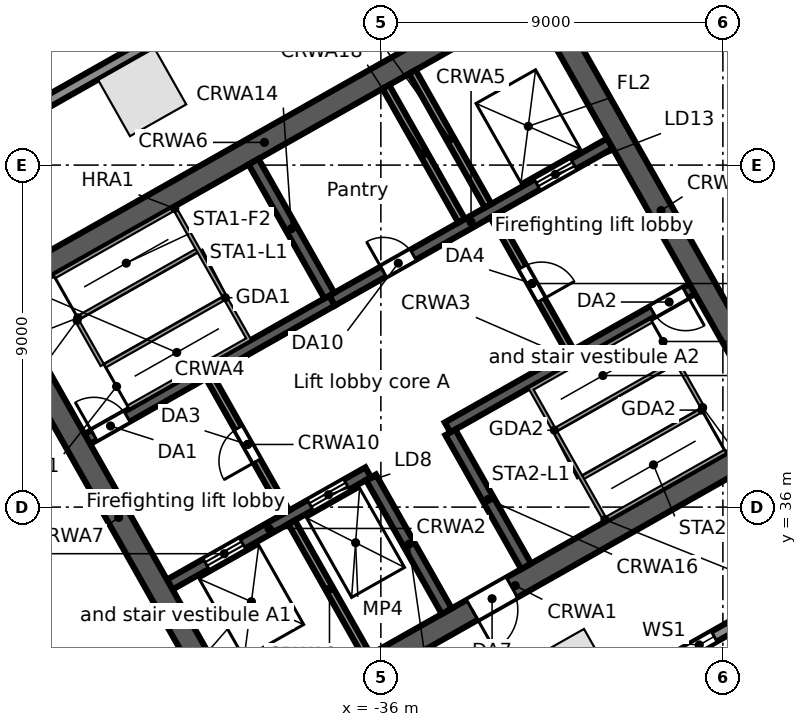
"""IFC4 building model, lengths in metres.
Left out: names, types, materials, properties, quantities, classifications, styles, units other than length and angle.
Written with IfcOpenShell. Run it as: python <this file> out.ifc"""

import sys

from ifc_helpers import new_model, si_unit, direction, frame, frame_2d, origin, origin_2d, place, context, subcontext, project, spatial, rectangle, extrude, element, fill, save


model = new_model("IFC4")
c1 = context("Model", 3, precision=1e-05, world=origin(), true_north=direction((0.0, 1.0)))
c2 = subcontext(c1, "Body", "Model", "MODEL_VIEW")
j1 = project(units=[si_unit("LENGTHUNIT", "METRE"), si_unit("PLANEANGLEUNIT", "RADIAN")], contexts=[c1])
p1 = place(None, origin())
s1 = spatial("IfcSite", under=j1, at=p1, CompositionType="ELEMENT")
p2 = place(p1, origin())
s2 = spatial("IfcBuilding", under=s1, at=p2, CompositionType="ELEMENT")
p3 = place(p2, frame((0.0, 0.0, 41.5)))
s3 = spatial("IfcBuildingStorey", under=s2, at=p3, CompositionType="ELEMENT", Elevation=41.5)
for number, where, z_axis, x_axis in (
    (1, (-42.28, 46.919, 0.0), (0.0, 0.0, 1.0), (-0.87, -0.492, 0.0)),
    (2, (-30.976, 31.635, 0.0), (0.0, 0.0, 1.0), (0.87, 0.492, 0.0)),
):
    element("IfcColumn", number, at=place(p3, frame(where, z_axis=z_axis, x_axis=x_axis)), inside=s3, PredefinedType="COLUMN", context=c2, shape_type="SweptSolid", body=[
        extrude(rectangle(XDim=1.7, YDim=1.7, at=origin_2d()), origin(), (0.0, 0.0, 1.0), 5.0),
    ])
p4 = place(p3, frame((-58.745, 38.764, 0.0), z_axis=(0.0, 0.0, 1.0), x_axis=(0.870355811726, 0.492423355453, 0.0)))
e3 = element("IfcWall", 3, at=p4, inside=s3, PredefinedType="STANDARD", context=c2, shape_type="SweptSolid", body=[
    extrude(rectangle(XDim=64.025, YDim=0.3, at=frame_2d((32.013, 0.0))), origin(), (0.0, 0.0, 1.0), 4.68),
])
p5 = place(p4, frame((60.122, 0.0, 0.6)))
e4 = element("IfcOpeningElement", 4, at=p5, cuts=e3, PredefinedType="OPENING", context=c2, shape_type="SweptSolid", body=[
    extrude(rectangle(XDim=0.9, YDim=3.2, at=frame_2d((0.45, 1.6))), frame((0.0, 0.16, 0.0), z_axis=(0.0, -1.0, 0.0), x_axis=(1.0, 0.0, 0.0)), (0.0, 0.0, 1.0), 0.32),
])
p6 = place(p4, frame((50.992, 0.0, 0.6)))
e5 = element("IfcOpeningElement", 5, at=p6, cuts=e3, PredefinedType="OPENING", context=c2, shape_type="SweptSolid", body=[
    extrude(rectangle(XDim=0.9, YDim=3.2, at=frame_2d((0.45, 1.6))), frame((0.0, 0.16, 0.0), z_axis=(0.0, -1.0, 0.0), x_axis=(1.0, 0.0, 0.0)), (0.0, 0.0, 1.0), 0.32),
])
p7 = place(p4, frame((41.862, 0.0, 0.6)))
e6 = element("IfcOpeningElement", 6, at=p7, cuts=e3, PredefinedType="OPENING", context=c2, shape_type="SweptSolid", body=[
    extrude(rectangle(XDim=0.9, YDim=3.2, at=frame_2d((0.45, 1.6))), frame((0.0, 0.16, 0.0), z_axis=(0.0, -1.0, 0.0), x_axis=(1.0, 0.0, 0.0)), (0.0, 0.0, 1.0), 0.32),
])
p8 = place(p4, frame((32.732, 0.0, 0.6)))
e7 = element("IfcOpeningElement", 7, at=p8, cuts=e3, PredefinedType="OPENING", context=c2, shape_type="SweptSolid", body=[
    extrude(rectangle(XDim=0.9, YDim=3.2, at=frame_2d((0.45, 1.6))), frame((0.0, 0.16, 0.0), z_axis=(0.0, -1.0, 0.0), x_axis=(1.0, 0.0, 0.0)), (0.0, 0.0, 1.0), 0.32),
])
p9 = place(p4, frame((23.602, 0.0, 0.6)))
e8 = element("IfcOpeningElement", 8, at=p9, cuts=e3, PredefinedType="OPENING", context=c2, shape_type="SweptSolid", body=[
    extrude(rectangle(XDim=0.9, YDim=3.2, at=frame_2d((0.45, 1.6))), frame((0.0, 0.16, 0.0), z_axis=(0.0, -1.0, 0.0), x_axis=(1.0, 0.0, 0.0)), (0.0, 0.0, 1.0), 0.32),
])
p10 = place(p4, frame((14.472, 0.0, 0.6)))
e9 = element("IfcOpeningElement", 9, at=p10, cuts=e3, PredefinedType="OPENING", context=c2, shape_type="SweptSolid", body=[
    extrude(rectangle(XDim=0.9, YDim=3.2, at=frame_2d((0.45, 1.6))), frame((0.0, 0.16, 0.0), z_axis=(0.0, -1.0, 0.0), x_axis=(1.0, 0.0, 0.0)), (0.0, 0.0, 1.0), 0.32),
])
p11 = place(p4, frame((5.342, 0.0, 0.6)))
e10 = element("IfcOpeningElement", 10, at=p11, cuts=e3, PredefinedType="OPENING", context=c2, shape_type="SweptSolid", body=[
    extrude(rectangle(XDim=0.9, YDim=3.2, at=frame_2d((0.45, 1.6))), frame((0.0, 0.16, 0.0), z_axis=(0.0, -1.0, 0.0), x_axis=(1.0, 0.0, 0.0)), (0.0, 0.0, 1.0), 0.32),
])
p12 = place(p3, frame((-44.109, 26.504, 0.0), z_axis=(0.0, 0.0, 1.0), x_axis=(-0.857169502585, 0.515034410344, 0.0)))
e11 = element("IfcWall", 11, at=p12, inside=s3, PredefinedType="STANDARD", context=c2, shape_type="SweptSolid", body=[
    extrude(rectangle(XDim=17.127, YDim=0.3, at=frame_2d((8.563, 0.0))), origin(), (0.0, 0.0, 1.0), 4.68),
])
p13 = place(p12, frame((13.403, 0.0, 0.6)))
e12 = element("IfcOpeningElement", 12, at=p13, cuts=e11, PredefinedType="OPENING", context=c2, shape_type="SweptSolid", body=[
    extrude(rectangle(XDim=0.9, YDim=3.2, at=frame_2d((0.45, 1.6))), frame((0.0, 0.16, 0.0), z_axis=(0.0, -1.0, 0.0), x_axis=(1.0, 0.0, 0.0)), (0.0, 0.0, 1.0), 0.32),
])
p14 = place(p12, frame((4.903, 0.0, 0.6)))
e13 = element("IfcOpeningElement", 13, at=p14, cuts=e11, PredefinedType="OPENING", context=c2, shape_type="SweptSolid", body=[
    extrude(rectangle(XDim=0.9, YDim=3.2, at=frame_2d((0.45, 1.6))), frame((0.0, 0.16, 0.0), z_axis=(0.0, -1.0, 0.0), x_axis=(1.0, 0.0, 0.0)), (0.0, 0.0, 1.0), 0.32),
])
p15 = place(p3, frame((-0.055, 47.969, 0.0), z_axis=(0.0, 0.0, 1.0), x_axis=(-0.870355730478, -0.492423499058, 0.0)))
e14 = element("IfcWall", 14, at=p15, inside=s3, PredefinedType="STANDARD", context=c2, shape_type="SweptSolid", body=[
    extrude(rectangle(XDim=43.75, YDim=0.3, at=frame_2d((21.875, 0.0))), origin(), (0.0, 0.0, 1.0), 4.68),
])
p16 = place(p15, frame((39.977, 0.0, 0.6)))
e15 = element("IfcOpeningElement", 15, at=p16, cuts=e14, PredefinedType="OPENING", context=c2, shape_type="SweptSolid", body=[
    extrude(rectangle(XDim=0.9, YDim=3.2, at=frame_2d((0.45, 1.6))), frame((0.0, 0.16, 0.0), z_axis=(0.0, -1.0, 0.0), x_axis=(1.0, 0.0, 0.0)), (0.0, 0.0, 1.0), 0.32),
])
p17 = place(p15, frame((31.222, 0.0, 0.6)))
e16 = element("IfcOpeningElement", 16, at=p17, cuts=e14, PredefinedType="OPENING", context=c2, shape_type="SweptSolid", body=[
    extrude(rectangle(XDim=0.9, YDim=3.2, at=frame_2d((0.45, 1.6))), frame((0.0, 0.16, 0.0), z_axis=(0.0, -1.0, 0.0), x_axis=(1.0, 0.0, 0.0)), (0.0, 0.0, 1.0), 0.32),
])
p18 = place(p15, frame((22.468, 0.0, 0.6)))
e17 = element("IfcOpeningElement", 17, at=p18, cuts=e14, PredefinedType="OPENING", context=c2, shape_type="SweptSolid", body=[
    extrude(rectangle(XDim=0.9, YDim=3.2, at=frame_2d((0.45, 1.6))), frame((0.0, 0.16, 0.0), z_axis=(0.0, -1.0, 0.0), x_axis=(1.0, 0.0, 0.0)), (0.0, 0.0, 1.0), 0.32),
])
p19 = place(p15, frame((13.713, 0.0, 0.6)))
e18 = element("IfcOpeningElement", 18, at=p19, cuts=e14, PredefinedType="OPENING", context=c2, shape_type="SweptSolid", body=[
    extrude(rectangle(XDim=0.9, YDim=3.2, at=frame_2d((0.45, 1.6))), frame((0.0, 0.16, 0.0), z_axis=(0.0, -1.0, 0.0), x_axis=(1.0, 0.0, 0.0)), (0.0, 0.0, 1.0), 0.32),
])
p20 = place(p15, frame((4.959, 0.0, 0.6)))
e19 = element("IfcOpeningElement", 19, at=p20, cuts=e14, PredefinedType="OPENING", context=c2, shape_type="SweptSolid", body=[
    extrude(rectangle(XDim=0.9, YDim=3.2, at=frame_2d((0.45, 1.6))), frame((0.0, 0.16, 0.0), z_axis=(0.0, -1.0, 0.0), x_axis=(1.0, 0.0, 0.0)), (0.0, 0.0, 1.0), 0.32),
])
p21 = place(p3, frame((-39.862, 29.749, 0.0), z_axis=(0.0, 0.0, 1.0), x_axis=(0.870350116061, 0.492433422375, 0.0)))
e20 = element("IfcWall", 20, at=p21, inside=s3, PredefinedType="SOLIDWALL", context=c2, shape_type="SweptSolid", body=[
    extrude(rectangle(XDim=17.0, YDim=0.6, at=frame_2d((8.5, 0.0))), origin(), (0.0, 0.0, 1.0), 4.68),
])
p22 = place(p21, frame((7.2, 0.0, 0.0)))
e21 = element("IfcOpeningElement", 21, at=p22, cuts=e20, PredefinedType="OPENING", context=c2, shape_type="SweptSolid", body=[
    extrude(rectangle(XDim=1.2, YDim=2.1, at=frame_2d((0.6, 1.05))), frame((0.0, 0.31, 0.0), z_axis=(0.0, -1.0, 0.0), x_axis=(1.0, 0.0, 0.0)), (0.0, 0.0, 1.0), 0.62),
])
p23 = place(p3, frame((-41.556, 33.961, 0.0), z_axis=(0.0, 0.0, 1.0), x_axis=(0.870343731308, 0.492444706919, 0.0)))
e22 = element("IfcWall", 22, at=p23, inside=s3, PredefinedType="SOLIDWALL", context=c2, shape_type="SweptSolid", body=[
    extrude(rectangle(XDim=6.0, YDim=0.3, at=frame_2d((3.0, 0.0))), origin(), (0.0, 0.0, 1.0), 4.68),
])
p24 = place(p23, frame((1.1, 0.0, 0.0)))
e23 = element("IfcOpeningElement", 23, at=p24, cuts=e22, PredefinedType="OPENING", context=c2, shape_type="SweptSolid", body=[
    extrude(rectangle(XDim=1.1, YDim=2.1, at=frame_2d((0.55, 1.05))), frame((0.0, 0.16, 0.0), z_axis=(0.0, -1.0, 0.0), x_axis=(1.0, 0.0, 0.0)), (0.0, 0.0, 1.0), 0.32),
])
p25 = place(p23, frame((4.25, 0.0, 0.0)))
e24 = element("IfcOpeningElement", 24, at=p25, cuts=e22, PredefinedType="OPENING", context=c2, shape_type="SweptSolid", body=[
    extrude(rectangle(XDim=1.1, YDim=2.1, at=frame_2d((0.55, 1.05))), frame((0.0, 0.16, 0.0), z_axis=(0.0, -1.0, 0.0), x_axis=(1.0, 0.0, 0.0)), (0.0, 0.0, 1.0), 0.32),
])
p26 = place(p3, frame((-34.245, 38.097, 0.0), z_axis=(0.0, 0.0, 1.0), x_axis=(0.870364910201, 0.492407273597, 0.0)))
e25 = element("IfcWall", 25, at=p26, inside=s3, PredefinedType="SOLIDWALL", context=c2, shape_type="SweptSolid", body=[
    extrude(rectangle(XDim=7.4, YDim=0.3, at=frame_2d((3.7, 0.0))), origin(), (0.0, 0.0, 1.0), 4.68),
])
p27 = place(p26, frame((6.2, 0.0, 0.0)))
e26 = element("IfcOpeningElement", 26, at=p27, cuts=e25, PredefinedType="OPENING", context=c2, shape_type="SweptSolid", body=[
    extrude(rectangle(XDim=1.0, YDim=2.1, at=frame_2d((0.5, 1.05))), frame((0.0, 0.16, 0.0), z_axis=(0.0, -1.0, 0.0), x_axis=(1.0, 0.0, 0.0)), (0.0, 0.0, 1.0), 0.32),
])
p28 = place(p3, frame((-43.723, 37.791, 0.0), z_axis=(0.0, 0.0, 1.0), x_axis=(0.87035077051, 0.49243226567, 0.0)))
e27 = element("IfcWall", 27, at=p28, inside=s3, PredefinedType="SOLIDWALL", context=c2, shape_type="SweptSolid", body=[
    extrude(rectangle(XDim=7.4, YDim=0.3, at=frame_2d((3.7, 0.0))), origin(), (0.0, 0.0, 1.0), 4.68),
])
p29 = place(p28, frame((0.2, 0.0, 0.0)))
e28 = element("IfcOpeningElement", 28, at=p29, cuts=e27, PredefinedType="OPENING", context=c2, shape_type="SweptSolid", body=[
    extrude(rectangle(XDim=1.0, YDim=2.1, at=frame_2d((0.5, 1.05))), frame((0.0, 0.16, 0.0), z_axis=(0.0, -1.0, 0.0), x_axis=(1.0, 0.0, 0.0)), (0.0, 0.0, 1.0), 0.32),
])
p30 = place(p3, frame((-37.282, 41.435, 0.0), z_axis=(0.0, 0.0, 1.0), x_axis=(0.870356516133, 0.492422110414, 0.0)))
e29 = element("IfcWall", 29, at=p30, inside=s3, PredefinedType="SOLIDWALL", context=c2, shape_type="SweptSolid", body=[
    extrude(rectangle(XDim=8.4, YDim=0.3, at=frame_2d((4.2, 0.0))), origin(), (0.0, 0.0, 1.0), 4.68),
])
p31 = place(p30, frame((6.2, 0.0, 0.0)))
e30 = element("IfcOpeningElement", 30, at=p31, cuts=e29, PredefinedType="OPENING", context=c2, shape_type="SweptSolid", body=[
    extrude(rectangle(XDim=1.1, YDim=2.1, at=frame_2d((0.55, 1.05))), frame((0.0, 0.16, 0.0), z_axis=(0.0, -1.0, 0.0), x_axis=(1.0, 0.0, 0.0)), (0.0, 0.0, 1.0), 0.32),
])
p32 = place(p30, frame((1.55, 0.0, 0.0)))
e31 = element("IfcOpeningElement", 31, at=p32, cuts=e29, PredefinedType="OPENING", context=c2, shape_type="SweptSolid", body=[
    extrude(rectangle(XDim=0.9, YDim=2.1, at=frame_2d((0.45, 1.05))), frame((0.0, 0.16, 0.0), z_axis=(0.0, -1.0, 0.0), x_axis=(1.0, 0.0, 0.0)), (0.0, 0.0, 1.0), 0.32),
])
p33 = place(p3, frame((-46.461, 41.412, 0.0), z_axis=(0.0, 0.0, 1.0), x_axis=(0.870350116061, 0.492433422375, 0.0)))
e32 = element("IfcWall", 32, at=p33, inside=s3, PredefinedType="SOLIDWALL", context=c2, shape_type="SweptSolid", body=[
    extrude(rectangle(XDim=17.0, YDim=0.6, at=frame_2d((8.5, 0.0))), origin(), (0.0, 0.0, 1.0), 4.68),
])
p34 = place(p3, frame((-46.052, 41.298, 0.0), z_axis=(0.0, 0.0, 1.0), x_axis=(0.492418598281, -0.870358503186, 0.0)))
e33 = element("IfcWall", 33, at=p34, inside=s3, PredefinedType="SOLIDWALL", context=c2, shape_type="SweptSolid", body=[
    extrude(rectangle(XDim=12.8, YDim=0.6, at=frame_2d((6.4, 0.0))), origin(), (0.0, 0.0, 1.0), 4.68),
])
p35 = place(p3, frame((-38.349, 35.603, 0.0), z_axis=(0.0, 0.0, 1.0), x_axis=(0.49241474071, -0.870360685654, 0.0)))
e34 = element("IfcWall", 34, at=p35, inside=s3, PredefinedType="SOLIDWALL", context=c2, shape_type="SweptSolid", body=[
    extrude(rectangle(XDim=4.05, YDim=0.2, at=frame_2d((2.025, 0.0))), origin(), (0.0, 0.0, 1.0), 4.68),
])
p36 = place(p3, frame((-40.516, 39.433, 0.0), z_axis=(0.0, 0.0, 1.0), x_axis=(0.492453559952, -0.87033872216, 0.0)))
e35 = element("IfcWall", 35, at=p36, inside=s3, PredefinedType="PARTITIONING", context=c2, shape_type="SweptSolid", body=[
    extrude(rectangle(XDim=4.1, YDim=0.2, at=frame_2d((2.05, 0.0))), origin(), (0.0, 0.0, 1.0), 4.68),
])
p37 = place(p36, frame((1.55, 0.0, 0.0)))
e36 = element("IfcOpeningElement", 36, at=p37, cuts=e35, PredefinedType="OPENING", context=c2, shape_type="SweptSolid", body=[
    extrude(rectangle(XDim=1.0, YDim=2.1, at=frame_2d((0.5, 1.05))), frame((0.0, 0.11, 0.0), z_axis=(0.0, -1.0, 0.0), x_axis=(1.0, 0.0, 0.0)), (0.0, 0.0, 1.0), 0.22),
])
p38 = place(p3, frame((-36.26, 36.785, 0.0), z_axis=(0.0, 0.0, 1.0), x_axis=(0.492440575896, -0.870346068648, 0.0)))
e37 = element("IfcWall", 37, at=p38, inside=s3, PredefinedType="SOLIDWALL", context=c2, shape_type="SweptSolid", body=[
    extrude(rectangle(XDim=4.05, YDim=0.3, at=frame_2d((2.025, 0.0))), origin(), (0.0, 0.0, 1.0), 4.68),
])
p39 = place(p3, frame((-39.35, 45.09, 0.0), z_axis=(0.0, 0.0, 1.0), x_axis=(0.49241474071, -0.870360685654, 0.0)))
e38 = element("IfcWall", 38, at=p39, inside=s3, PredefinedType="SOLIDWALL", context=c2, shape_type="SweptSolid", body=[
    extrude(rectangle(XDim=4.05, YDim=0.3, at=frame_2d((2.025, 0.0))), origin(), (0.0, 0.0, 1.0), 4.68),
])
p40 = place(p3, frame((-34.171, 37.967, 0.0), z_axis=(0.0, 0.0, 1.0), x_axis=(0.492394910396, -0.870371904542, 0.0)))
e39 = element("IfcWall", 39, at=p40, inside=s3, PredefinedType="SOLIDWALL", context=c2, shape_type="SweptSolid", body=[
    extrude(rectangle(XDim=4.05, YDim=0.3, at=frame_2d((2.025, 0.0))), origin(), (0.0, 0.0, 1.0), 4.68),
])
p41 = place(p3, frame((-35.869, 47.06, 0.0), z_axis=(0.0, 0.0, 1.0), x_axis=(0.49241474071, -0.870360685654, 0.0)))
e40 = element("IfcWall", 40, at=p41, inside=s3, PredefinedType="SOLIDWALL", context=c2, shape_type="SweptSolid", body=[
    extrude(rectangle(XDim=4.05, YDim=0.2, at=frame_2d((2.025, 0.0))), origin(), (0.0, 0.0, 1.0), 4.68),
])
p42 = place(p3, frame((-33.031, 43.667, 0.0), z_axis=(0.0, 0.0, 1.0), x_axis=(0.492408451753, -0.87036424366, 0.0)))
e41 = element("IfcWall", 41, at=p42, inside=s3, PredefinedType="PARTITIONING", context=c2, shape_type="SweptSolid", body=[
    extrude(rectangle(XDim=4.1, YDim=0.2, at=frame_2d((2.05, 0.0))), origin(), (0.0, 0.0, 1.0), 4.68),
])
p43 = place(p42, frame((1.55, 0.0, 0.0)))
e42 = element("IfcOpeningElement", 42, at=p43, cuts=e41, PredefinedType="OPENING", context=c2, shape_type="SweptSolid", body=[
    extrude(rectangle(XDim=1.0, YDim=2.1, at=frame_2d((0.5, 1.05))), frame((0.0, 0.11, 0.0), z_axis=(0.0, -1.0, 0.0), x_axis=(1.0, 0.0, 0.0)), (0.0, 0.0, 1.0), 0.22),
])
p44 = place(p3, frame((-35.173, 47.454, 0.0), z_axis=(0.0, 0.0, 1.0), x_axis=(0.492440575896, -0.870346068648, 0.0)))
e43 = element("IfcWall", 43, at=p44, inside=s3, PredefinedType="SOLIDWALL", context=c2, shape_type="SweptSolid", body=[
    extrude(rectangle(XDim=4.05, YDim=0.2, at=frame_2d((2.025, 0.0))), origin(), (0.0, 0.0, 1.0), 4.68),
])
p45 = place(p3, frame((-31.778, 49.374, 0.0), z_axis=(0.0, 0.0, 1.0), x_axis=(0.492433046652, -0.870350328641, 0.0)))
e44 = element("IfcWall", 44, at=p45, inside=s3, PredefinedType="SOLIDWALL", context=c2, shape_type="SweptSolid", body=[
    extrude(rectangle(XDim=12.8, YDim=0.6, at=frame_2d((6.4, 0.0))), origin(), (0.0, 0.0, 1.0), 4.68),
])
p46 = place(p17, origin())
e45 = element("IfcWindow", 45, at=p46, inside=s3, PartitioningType="SINGLE_PANEL", PredefinedType="WINDOW", context=c2, shape_type="SweptSolid", body=[
    extrude(rectangle(XDim=0.9, YDim=3.2, at=frame_2d((0.45, 1.6))), frame((0.0, 0.03, 0.0), z_axis=(0.0, -1.0, 0.0), x_axis=(1.0, 0.0, 0.0)), (0.0, 0.0, 1.0), 0.06),
])
fill(e16, e45)
p47 = place(p31, origin())
e46 = element("IfcDoor", 46, at=p47, inside=s3, OperationType="DOUBLE_DOOR_SLIDING", PredefinedType="DOOR", context=c2, shape_type="SweptSolid", body=[
    extrude(rectangle(XDim=1.1, YDim=2.1, at=frame_2d((0.55, 1.05))), frame((0.0, 0.025, 0.0), z_axis=(0.0, -1.0, 0.0), x_axis=(1.0, 0.0, 0.0)), (0.0, 0.0, 1.0), 0.05),
])
fill(e30, e46)
p48 = place(p24, origin())
e47 = element("IfcDoor", 47, at=p48, inside=s3, OperationType="DOUBLE_DOOR_SLIDING", PredefinedType="DOOR", context=c2, shape_type="SweptSolid", body=[
    extrude(rectangle(XDim=1.1, YDim=2.1, at=frame_2d((0.55, 1.05))), frame((0.0, 0.025, 0.0), z_axis=(0.0, -1.0, 0.0), x_axis=(1.0, 0.0, 0.0)), (0.0, 0.0, 1.0), 0.05),
])
fill(e23, e47)
p49 = place(p25, origin())
e48 = element("IfcDoor", 48, at=p49, inside=s3, OperationType="DOUBLE_DOOR_SLIDING", PredefinedType="DOOR", context=c2, shape_type="SweptSolid", body=[
    extrude(rectangle(XDim=1.1, YDim=2.1, at=frame_2d((0.55, 1.05))), frame((0.0, 0.025, 0.0), z_axis=(0.0, -1.0, 0.0), x_axis=(1.0, 0.0, 0.0)), (0.0, 0.0, 1.0), 0.05),
])
fill(e24, e48)
p50 = place(p29, origin())
e49 = element("IfcDoor", 49, at=p50, inside=s3, OperationType="SINGLE_SWING_LEFT", PredefinedType="DOOR", context=c2, shape_type="SweptSolid", body=[
    extrude(rectangle(XDim=1.0, YDim=2.1, at=frame_2d((0.5, 1.05))), frame((0.0, 0.025, 0.0), z_axis=(0.0, -1.0, 0.0), x_axis=(1.0, 0.0, 0.0)), (0.0, 0.0, 1.0), 0.05),
])
fill(e28, e49)
p51 = place(p27, frame((1.0, 0.0, 0.0), z_axis=(0.0, 0.0, 1.0), x_axis=(-1.0, 0.0, 0.0)))
e50 = element("IfcDoor", 50, at=p51, inside=s3, OperationType="SINGLE_SWING_LEFT", PredefinedType="DOOR", context=c2, shape_type="SweptSolid", body=[
    extrude(rectangle(XDim=1.0, YDim=2.1, at=frame_2d((0.5, 1.05))), frame((0.0, 0.025, 0.0), z_axis=(0.0, -1.0, 0.0), x_axis=(1.0, 0.0, 0.0)), (0.0, 0.0, 1.0), 0.05),
])
fill(e26, e50)
p52 = place(p37, frame((1.0, 0.0, 0.0), z_axis=(0.0, 0.0, 1.0), x_axis=(-1.0, 0.0, 0.0)))
e51 = element("IfcDoor", 51, at=p52, inside=s3, OperationType="SINGLE_SWING_LEFT", PredefinedType="DOOR", context=c2, shape_type="SweptSolid", body=[
    extrude(rectangle(XDim=1.0, YDim=2.1, at=frame_2d((0.5, 1.05))), frame((0.0, 0.025, 0.0), z_axis=(0.0, -1.0, 0.0), x_axis=(1.0, 0.0, 0.0)), (0.0, 0.0, 1.0), 0.05),
])
fill(e36, e51)
p53 = place(p43, origin())
e52 = element("IfcDoor", 52, at=p53, inside=s3, OperationType="SINGLE_SWING_RIGHT", PredefinedType="DOOR", context=c2, shape_type="SweptSolid", body=[
    extrude(rectangle(XDim=1.0, YDim=2.1, at=frame_2d((0.5, 1.05))), frame((0.0, 0.025, 0.0), z_axis=(0.0, -1.0, 0.0), x_axis=(1.0, 0.0, 0.0)), (0.0, 0.0, 1.0), 0.05),
])
fill(e42, e52)
p54 = place(p22, frame((1.2, 0.0, 0.0), z_axis=(0.0, 0.0, 1.0), x_axis=(-1.0, 0.0, 0.0)))
e53 = element("IfcDoor", 53, at=p54, inside=s3, OperationType="SINGLE_SWING_RIGHT", PredefinedType="DOOR", context=c2, shape_type="SweptSolid", body=[
    extrude(rectangle(XDim=1.2, YDim=2.1, at=frame_2d((0.6, 1.05))), frame((0.0, 0.025, 0.0), z_axis=(0.0, -1.0, 0.0), x_axis=(1.0, 0.0, 0.0)), (0.0, 0.0, 1.0), 0.05),
])
fill(e21, e53)
p55 = place(p32, origin())
e54 = element("IfcDoor", 54, at=p55, inside=s3, OperationType="SINGLE_SWING_LEFT", PredefinedType="DOOR", context=c2, shape_type="SweptSolid", body=[
    extrude(rectangle(XDim=0.9, YDim=2.1, at=frame_2d((0.45, 1.05))), frame((0.0, 0.025, 0.0), z_axis=(0.0, -1.0, 0.0), x_axis=(1.0, 0.0, 0.0)), (0.0, 0.0, 1.0), 0.05),
])
fill(e31, e54)
save(model, sys.argv[1])
